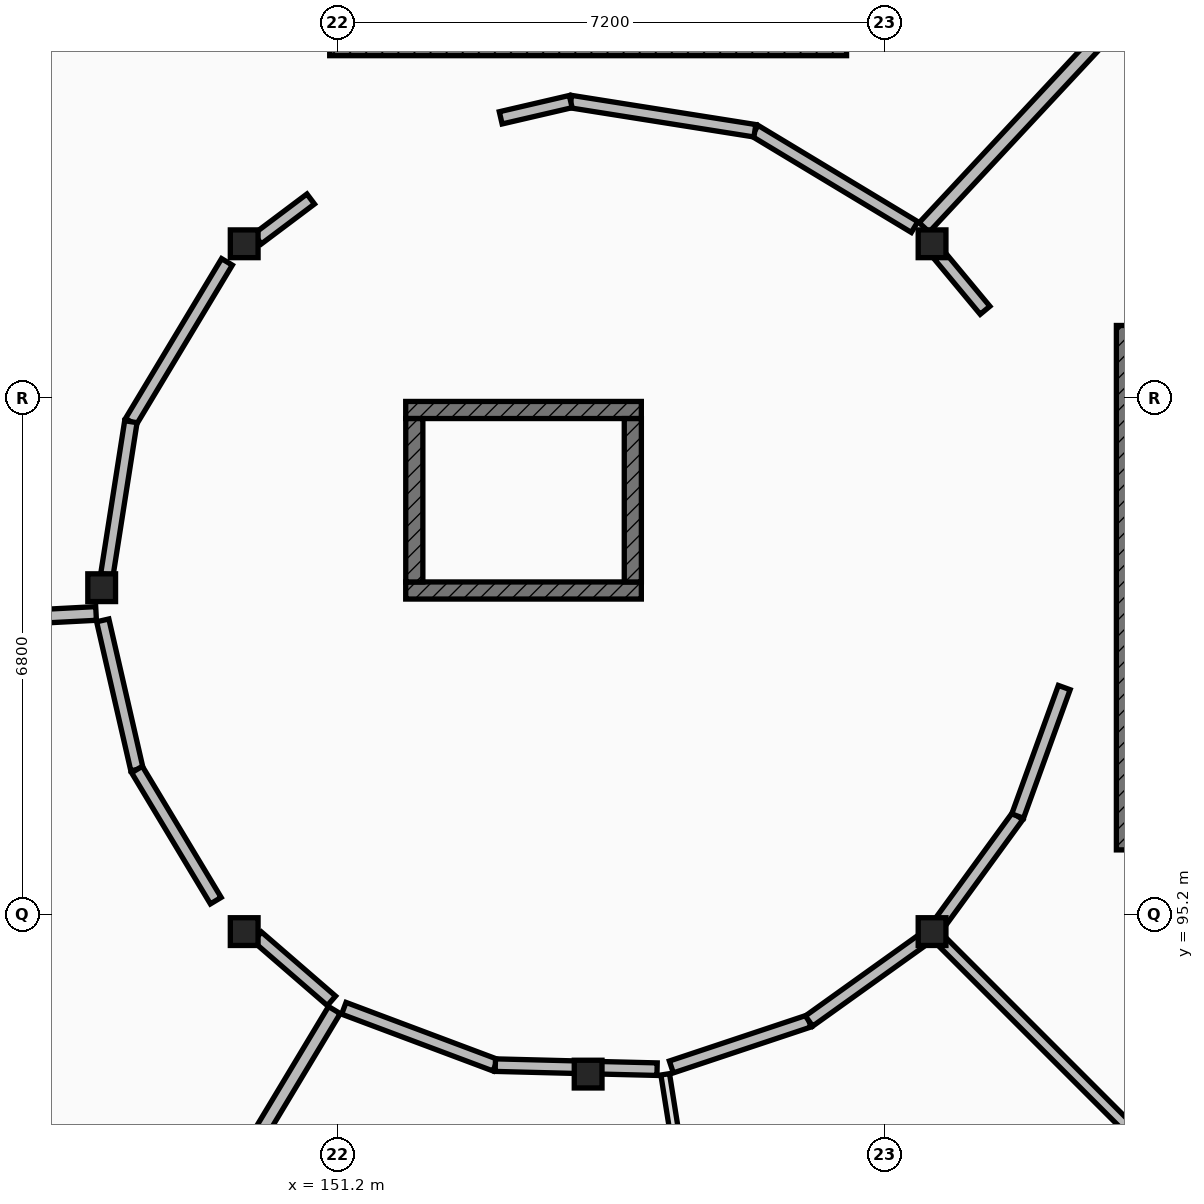
"""IFC4 building model, lengths in metres.
Left out: names, types, materials, properties, quantities, classifications, styles, units other than length and angle.
Written with IfcOpenShell. Run it as: python <this file> out.ifc"""

import sys

from ifc_helpers import new_model, si_unit, direction, frame, frame_2d, origin, origin_2d, place, context, subcontext, project, spatial, rectangle, extrude, element, fill, save


model = new_model("IFC4")
c1 = context("Model", 3, precision=1e-05, world=origin(), true_north=direction((0.0, 1.0)))
c2 = subcontext(c1, "Body", "Model", "MODEL_VIEW")
j1 = project(units=[si_unit("LENGTHUNIT", "METRE"), si_unit("PLANEANGLEUNIT", "RADIAN")], contexts=[c1])
p1 = place(None, origin())
s1 = spatial("IfcSite", under=j1, at=p1, CompositionType="ELEMENT")
p2 = place(p1, origin())
s2 = spatial("IfcBuilding", under=s1, at=p2, CompositionType="ELEMENT")
p3 = place(p2, frame((0.0, 0.0, 4.55)))
s3 = spatial("IfcBuildingStorey", under=s2, at=p3, CompositionType="ELEMENT", Elevation=4.55)
for number, where, z_axis, x_axis in (
    (1, (159.025, 104.025, 0.0), (0.0, 0.0, 1.0), (1.0, 0.0, 0.0)),
    (2, (149.975, 104.025, 0.0), (0.0, 0.0, 1.0), (1.0, 0.0, 0.0)),
    (3, (148.1, 99.5, 0.0), (0.0, 0.0, 1.0), (1.0, 0.0, 0.0)),
    (4, (149.975, 94.975, 0.0), (0.0, 0.0, 1.0), (1.0, 0.0, 0.0)),
    (5, (154.5, 93.1, 0.0), (0.0, 0.0, 1.0), (1.0, 0.0, 0.0)),
    (6, (159.025, 94.975, 0.0), (0.0, 0.0, 1.0), (1.0, 0.0, 0.0)),
):
    element("IfcColumn", number, at=place(p3, frame(where, z_axis=z_axis, x_axis=x_axis)), inside=s3, PredefinedType="COLUMN", context=c2, shape_type="SweptSolid", body=[
        extrude(rectangle(XDim=0.365, YDim=0.365, at=origin_2d()), origin(), (0.0, 0.0, 1.0), 4.2),
    ])
p4 = place(p3, frame((161.575, 102.95, 0.0), z_axis=(0.0, 0.0, 1.0), x_axis=(0.0, -1.0, 0.0)))
e7 = element("IfcWall", 7, at=p4, inside=s3, PredefinedType="SHEAR", context=c2, shape_type="SweptSolid", body=[
    extrude(rectangle(XDim=6.9, YDim=0.25, at=frame_2d((3.45, 0.0))), origin(), (0.0, 0.0, 1.0), 3.955),
])
p5 = place(p4, frame((0.43, 0.0, 0.0)))
e8 = element("IfcOpeningElement", 8, at=p5, cuts=e7, PredefinedType="OPENING", context=c2, shape_type="SweptSolid", body=[
    extrude(rectangle(XDim=1.1, YDim=2.15, at=frame_2d((0.55, 1.075))), frame((0.0, 0.135, 0.0), z_axis=(0.0, -1.0, 0.0), x_axis=(1.0, 0.0, 0.0)), (0.0, 0.0, 1.0), 0.27),
])
p6 = place(p3, frame((151.1, 106.6, 0.0), z_axis=(0.0, 0.0, 1.0), x_axis=(1.0, 0.0, 0.0)))
e9 = element("IfcWall", 9, at=p6, inside=s3, PredefinedType="SHEAR", context=c2, shape_type="SweptSolid", body=[
    extrude(rectangle(XDim=6.8, YDim=0.2, at=frame_2d((3.4, 0.0))), origin(), (0.0, 0.0, 1.0), 3.955),
])
p7 = place(p6, frame((0.38, 0.0, 0.0)))
e10 = element("IfcOpeningElement", 10, at=p7, cuts=e9, PredefinedType="OPENING", context=c2, shape_type="SweptSolid", body=[
    extrude(rectangle(XDim=1.05, YDim=2.15, at=frame_2d((0.525, 1.075))), frame((0.0, 0.11, 0.0), z_axis=(0.0, -1.0, 0.0), x_axis=(1.0, 0.0, 0.0)), (0.0, 0.0, 1.0), 0.22),
])
p8 = place(p3, frame((152.1, 99.463, 0.0), z_axis=(0.0, 0.0, 1.0), x_axis=(1.0, 0.0, 0.0)))
e11 = element("IfcWall", 11, at=p8, inside=s3, PredefinedType="SHEAR", context=c2, shape_type="SweptSolid", body=[
    extrude(rectangle(XDim=3.1, YDim=0.225, at=frame_2d((1.55, 0.0))), origin(), (0.0, 0.0, 1.0), 3.955),
])
p9 = place(p8, frame((0.9, 0.0, 0.0)))
e12 = element("IfcOpeningElement", 12, at=p9, cuts=e11, PredefinedType="OPENING", context=c2, shape_type="SweptSolid", body=[
    extrude(rectangle(XDim=1.3, YDim=2.2, at=frame_2d((0.65, 1.1))), frame((0.0, 0.123, 0.0), z_axis=(0.0, -1.0, 0.0), x_axis=(1.0, 0.0, 0.0)), (0.0, 0.0, 1.0), 0.245),
])
p10 = place(p3, frame((152.1, 101.838, 0.0), z_axis=(0.0, 0.0, 1.0), x_axis=(1.0, 0.0, 0.0)))
e13 = element("IfcWall", 13, at=p10, inside=s3, PredefinedType="SHEAR", context=c2, shape_type="SweptSolid", body=[
    extrude(rectangle(XDim=3.1, YDim=0.225, at=frame_2d((1.55, 0.0))), origin(), (0.0, 0.0, 1.0), 3.955),
])
for number, where, z_axis, x_axis in (
    (14, (152.213, 99.575, 0.0), (0.0, 0.0, 1.0), (0.0, 1.0, 0.0)),
    (15, (155.088, 99.575, 0.0), (0.0, 0.0, 1.0), (0.0, 1.0, 0.0)),
):
    element("IfcWall", number, at=place(p3, frame(where, z_axis=z_axis, x_axis=x_axis)), inside=s3, PredefinedType="SHEAR", context=c2, shape_type="SweptSolid", body=[
        extrude(rectangle(XDim=2.15, YDim=0.225, at=frame_2d((1.075, 0.0))), origin(), (0.0, 0.0, 1.0), 3.955),
    ])
p11 = place(p3, frame((158.921, 104.241, 0.0), z_axis=(0.0, 0.0, 1.0), x_axis=(0.681975712302, 0.731374820342, 0.0)))
e16 = element("IfcWall", 16, at=p11, inside=s3, PredefinedType="PARTITIONING", context=c2, shape_type="SweptSolid", body=[
    extrude(rectangle(XDim=5.283, YDim=0.18, at=frame_2d((2.642, 0.0))), origin(), (0.0, 0.0, 1.0), 3.284),
])
p12 = place(p3, frame((148.026, 99.161, 0.0), z_axis=(0.0, 0.0, 1.0), x_axis=(-0.998629447921, -0.052337613105, 0.0)))
e17 = element("IfcWall", 17, at=p12, inside=s3, PredefinedType="PARTITIONING", context=c2, shape_type="SweptSolid", body=[
    extrude(rectangle(XDim=5.271, YDim=0.18, at=frame_2d((2.636, 0.0))), origin(), (0.0, 0.0, 1.0), 3.284),
])
p13 = place(p3, frame((151.161, 93.943, 0.0), z_axis=(0.0, 0.0, 1.0), x_axis=(-0.515026730069, -0.857174117268, 0.0)))
e18 = element("IfcWall", 18, at=p13, inside=s3, PredefinedType="PARTITIONING", context=c2, shape_type="SweptSolid", body=[
    extrude(rectangle(XDim=5.273, YDim=0.18, at=frame_2d((2.637, 0.0))), origin(), (0.0, 0.0, 1.0), 3.284),
])
p14 = place(p3, frame((155.514, 93.097, 0.0), z_axis=(0.0, 0.0, 1.0), x_axis=(0.156475439167, -0.98768185006, 0.0)))
e19 = element("IfcWall", 19, at=p14, inside=s3, PredefinedType="PARTITIONING", context=c2, shape_type="SweptSolid", body=[
    extrude(rectangle(XDim=5.28, YDim=0.115, at=frame_2d((2.64, 0.0))), origin(), (0.0, 0.0, 1.0), 3.284),
])
p15 = place(p3, frame((159.084, 94.916, 0.0), z_axis=(0.0, 0.0, 1.0), x_axis=(0.707106781187, -0.707106781187, 0.0)))
e20 = element("IfcWall", 20, at=p15, inside=s3, PredefinedType="PARTITIONING", context=c2, shape_type="SweptSolid", body=[
    extrude(rectangle(XDim=5.316, YDim=0.145, at=frame_2d((2.658, 0.0))), origin(), (0.0, 0.0, 1.0), 3.284),
])
p16 = place(p3, frame((158.795, 104.245, 0.0), z_axis=(0.0, 0.0, 1.0), x_axis=(-0.856349289231, 0.51639703217, 0.0)))
e21 = element("IfcWall", 21, at=p16, inside=s3, PredefinedType="PARTITIONING", context=c2, shape_type="SweptSolid", body=[
    extrude(rectangle(XDim=2.453, YDim=0.165, at=frame_2d((1.227, 0.0))), origin(), (0.0, 0.0, 1.0), 3.284),
])
p17 = place(p16, frame((0.477, 0.0, 0.0)))
e22 = element("IfcOpeningElement", 22, at=p17, cuts=e21, PredefinedType="OPENING", context=c2, shape_type="SweptSolid", body=[
    extrude(rectangle(XDim=1.5, YDim=2.3, at=frame_2d((0.75, 1.15))), frame((0.0, 0.093, 0.0), z_axis=(0.0, -1.0, 0.0), x_axis=(1.0, 0.0, 0.0)), (0.0, 0.0, 1.0), 0.185),
])
p18 = place(p3, frame((156.694, 105.512, 0.0), z_axis=(0.0, 0.0, 1.0), x_axis=(-0.987672430412, 0.156534884941, 0.0)))
e23 = element("IfcWall", 23, at=p18, inside=s3, PredefinedType="PARTITIONING", context=c2, shape_type="SweptSolid", body=[
    extrude(rectangle(XDim=2.453, YDim=0.165, at=frame_2d((1.227, 0.0))), origin(), (0.0, 0.0, 1.0), 3.284),
])
p19 = place(p3, frame((154.271, 105.896, 0.0), z_axis=(0.0, 0.0, 1.0), x_axis=(-0.974019949823, -0.226462220571, 0.0)))
e24 = element("IfcWall", 24, at=p19, inside=s3, PredefinedType="PARTITIONING", context=c2, shape_type="SweptSolid", body=[
    extrude(rectangle(XDim=0.946, YDim=0.165, at=frame_2d((0.473, 0.0))), origin(), (0.0, 0.0, 1.0), 3.284),
])
p20 = place(p3, frame((150.85, 104.614, 0.0), z_axis=(0.0, 0.0, 1.0), x_axis=(-0.799731853613, -0.600357362174, 0.0)))
e25 = element("IfcWall", 25, at=p20, inside=s3, PredefinedType="PARTITIONING", context=c2, shape_type="SweptSolid", body=[
    extrude(rectangle(XDim=0.874, YDim=0.165, at=frame_2d((0.437, 0.0))), origin(), (0.0, 0.0, 1.0), 3.284),
])
p21 = place(p3, frame((149.748, 103.787, 0.0), z_axis=(0.0, 0.0, 1.0), x_axis=(-0.515197917959, -0.857071237022, 0.0)))
e26 = element("IfcWall", 26, at=p21, inside=s3, PredefinedType="PARTITIONING", context=c2, shape_type="SweptSolid", body=[
    extrude(rectangle(XDim=2.454, YDim=0.165, at=frame_2d((1.227, 0.0))), origin(), (0.0, 0.0, 1.0), 3.284),
])
p22 = place(p21, frame((0.527, 0.0, 0.0)))
e27 = element("IfcOpeningElement", 27, at=p22, cuts=e26, PredefinedType="OPENING", context=c2, shape_type="SweptSolid", body=[
    extrude(rectangle(XDim=1.4, YDim=2.25, at=frame_2d((0.7, 1.125))), frame((0.0, 0.093, 0.0), z_axis=(0.0, -1.0, 0.0), x_axis=(1.0, 0.0, 0.0)), (0.0, 0.0, 1.0), 0.185),
])
p23 = place(p3, frame((148.484, 101.684, 0.0), z_axis=(0.0, 0.0, 1.0), x_axis=(-0.154797832722, -0.98794616806, 0.0)))
e28 = element("IfcWall", 28, at=p23, inside=s3, PredefinedType="PARTITIONING", context=c2, shape_type="SweptSolid", body=[
    extrude(rectangle(XDim=2.034, YDim=0.165, at=frame_2d((1.017, 0.0))), origin(), (0.0, 0.0, 1.0), 3.284),
])
p24 = place(p3, frame((148.114, 99.07, 0.0), z_axis=(0.0, 0.0, 1.0), x_axis=(0.223512984269, -0.974700952017, 0.0)))
e29 = element("IfcWall", 29, at=p24, inside=s3, PredefinedType="PARTITIONING", context=c2, shape_type="SweptSolid", body=[
    extrude(rectangle(XDim=2.013, YDim=0.165, at=frame_2d((1.007, 0.0))), origin(), (0.0, 0.0, 1.0), 3.284),
])
p25 = place(p24, frame((0.257, 0.0, 0.0)))
e30 = element("IfcOpeningElement", 30, at=p25, cuts=e29, PredefinedType="OPENING", context=c2, shape_type="SweptSolid", body=[
    extrude(rectangle(XDim=1.5, YDim=2.3, at=frame_2d((0.75, 1.15))), frame((0.0, 0.093, 0.0), z_axis=(0.0, -1.0, 0.0), x_axis=(1.0, 0.0, 0.0)), (0.0, 0.0, 1.0), 0.185),
])
p26 = place(p3, frame((148.564, 97.108, 0.0), z_axis=(0.0, 0.0, 1.0), x_axis=(0.515084069478, -0.857139662698, 0.0)))
e31 = element("IfcWall", 31, at=p26, inside=s3, PredefinedType="PARTITIONING", context=c2, shape_type="SweptSolid", body=[
    extrude(rectangle(XDim=2.013, YDim=0.165, at=frame_2d((1.007, 0.0))), origin(), (0.0, 0.0, 1.0), 3.284),
])
p27 = place(p3, frame((150.149, 94.907, 0.0), z_axis=(0.0, 0.0, 1.0), x_axis=(0.756157862191, -0.654389247655, 0.0)))
e32 = element("IfcWall", 32, at=p27, inside=s3, PredefinedType="PARTITIONING", context=c2, shape_type="SweptSolid", body=[
    extrude(rectangle(XDim=1.288, YDim=0.165, at=frame_2d((0.644, 0.0))), origin(), (0.0, 0.0, 1.0), 3.284),
])
p28 = place(p3, frame((151.286, 93.966, 0.0), z_axis=(0.0, 0.0, 1.0), x_axis=(0.93623488757, -0.35137477897, 0.0)))
e33 = element("IfcWall", 33, at=p28, inside=s3, PredefinedType="PARTITIONING", context=c2, shape_type="SweptSolid", body=[
    extrude(rectangle(XDim=2.129, YDim=0.165, at=frame_2d((1.064, 0.0))), origin(), (0.0, 0.0, 1.0), 3.284),
])
p29 = place(p28, frame((0.365, 0.0, 0.0)))
e34 = element("IfcOpeningElement", 34, at=p29, cuts=e33, PredefinedType="OPENING", context=c2, shape_type="SweptSolid", body=[
    extrude(rectangle(XDim=1.4, YDim=2.25, at=frame_2d((0.7, 1.125))), frame((0.0, 0.093, 0.0), z_axis=(0.0, -1.0, 0.0), x_axis=(1.0, 0.0, 0.0)), (0.0, 0.0, 1.0), 0.185),
])
p30 = place(p3, frame((153.279, 93.218, 0.0), z_axis=(0.0, 0.0, 1.0), x_axis=(0.999671430909, -0.025632600793, 0.0)))
e35 = element("IfcWall", 35, at=p30, inside=s3, PredefinedType="PARTITIONING", context=c2, shape_type="SweptSolid", body=[
    extrude(rectangle(XDim=1.057, YDim=0.165, at=frame_2d((0.529, 0.0))), origin(), (0.0, 0.0, 1.0), 3.284),
])
p31 = place(p3, frame((154.668, 93.183, 0.0), z_axis=(0.0, 0.0, 1.0), x_axis=(0.999701314602, -0.024439344989, 0.0)))
e36 = element("IfcWall", 36, at=p31, inside=s3, PredefinedType="PARTITIONING", context=c2, shape_type="SweptSolid", body=[
    extrude(rectangle(XDim=0.739, YDim=0.165, at=frame_2d((0.37, 0.0))), origin(), (0.0, 0.0, 1.0), 3.284),
])
p32 = place(p3, frame((155.595, 93.194, 0.0), z_axis=(0.0, 0.0, 1.0), x_axis=(0.948632132652, 0.316381220839, 0.0)))
e37 = element("IfcWall", 37, at=p32, inside=s3, PredefinedType="PARTITIONING", context=c2, shape_type="SweptSolid", body=[
    extrude(rectangle(XDim=1.909, YDim=0.165, at=frame_2d((0.955, 0.0))), origin(), (0.0, 0.0, 1.0), 3.284),
])
p33 = place(p32, frame((0.514, 0.0, 0.0)))
e38 = element("IfcOpeningElement", 38, at=p33, cuts=e37, PredefinedType="OPENING", context=c2, shape_type="SweptSolid", body=[
    extrude(rectangle(XDim=0.88, YDim=2.1, at=frame_2d((0.44, 1.05))), frame((0.0, 0.093, 0.0), z_axis=(0.0, -1.0, 0.0), x_axis=(1.0, 0.0, 0.0)), (0.0, 0.0, 1.0), 0.185),
])
p34 = place(p3, frame((157.406, 93.798, 0.0), z_axis=(0.0, 0.0, 1.0), x_axis=(0.813324248, 0.581810680218, 0.0)))
e39 = element("IfcWall", 39, at=p34, inside=s3, PredefinedType="PARTITIONING", context=c2, shape_type="SweptSolid", body=[
    extrude(rectangle(XDim=1.815, YDim=0.165, at=frame_2d((0.907, 0.0))), origin(), (0.0, 0.0, 1.0), 3.284),
])
p35 = place(p3, frame((159.147, 95.117, 0.0), z_axis=(0.0, 0.0, 1.0), x_axis=(0.588784523438, 0.808290037647, 0.0)))
e40 = element("IfcWall", 40, at=p35, inside=s3, PredefinedType="PARTITIONING", context=c2, shape_type="SweptSolid", body=[
    extrude(rectangle(XDim=1.705, YDim=0.165, at=frame_2d((0.853, 0.0))), origin(), (0.0, 0.0, 1.0), 3.284),
])
p36 = place(p35, frame((0.298, 0.0, 0.0)))
e41 = element("IfcOpeningElement", 41, at=p36, cuts=e40, PredefinedType="OPENING", context=c2, shape_type="SweptSolid", body=[
    extrude(rectangle(XDim=1.11, YDim=2.25, at=frame_2d((0.555, 1.125))), frame((0.0, 0.093, 0.0), z_axis=(0.0, -1.0, 0.0), x_axis=(1.0, 0.0, 0.0)), (0.0, 0.0, 1.0), 0.185),
])
p37 = place(p3, frame((160.151, 96.495, 0.0), z_axis=(0.0, 0.0, 1.0), x_axis=(0.340838314518, 0.940121930048, 0.0)))
e42 = element("IfcWall", 42, at=p37, inside=s3, PredefinedType="PARTITIONING", context=c2, shape_type="SweptSolid", body=[
    extrude(rectangle(XDim=1.799, YDim=0.165, at=frame_2d((0.899, 0.0))), origin(), (0.0, 0.0, 1.0), 3.284),
])
p38 = place(p3, frame((159.722, 103.15, 0.0), z_axis=(0.0, 0.0, 1.0), x_axis=(-0.639179373109, 0.769057688988, 0.0)))
e43 = element("IfcWall", 43, at=p38, inside=s3, PredefinedType="PARTITIONING", context=c2, shape_type="SweptSolid", body=[
    extrude(rectangle(XDim=0.932, YDim=0.165, at=frame_2d((0.466, 0.0))), origin(), (0.0, 0.0, 1.0), 3.284),
])
p39 = place(p5, origin())
e44 = element("IfcDoor", 44, at=p39, inside=s3, OperationType="SINGLE_SWING_LEFT", PredefinedType="DOOR", context=c2, shape_type="SweptSolid", body=[
    extrude(rectangle(XDim=1.1, YDim=2.15, at=frame_2d((0.55, 1.075))), frame((0.0, 0.025, 0.0), z_axis=(0.0, -1.0, 0.0), x_axis=(1.0, 0.0, 0.0)), (0.0, 0.0, 1.0), 0.05),
])
fill(e8, e44)
p40 = place(p9, origin())
e45 = element("IfcDoor", 45, at=p40, inside=s3, OperationType="DOUBLE_DOOR_SLIDING", PredefinedType="DOOR", context=c2, shape_type="SweptSolid", body=[
    extrude(rectangle(XDim=1.3, YDim=2.2, at=frame_2d((0.65, 1.1))), frame((0.0, 0.025, 0.0), z_axis=(0.0, -1.0, 0.0), x_axis=(1.0, 0.0, 0.0)), (0.0, 0.0, 1.0), 0.05),
])
fill(e12, e45)
p41 = place(p17, origin())
e46 = element("IfcDoor", 46, at=p41, inside=s3, OperationType="SINGLE_SWING_LEFT", PredefinedType="DOOR", context=c2, shape_type="SweptSolid", body=[
    extrude(rectangle(XDim=1.5, YDim=2.3, at=frame_2d((0.75, 1.15))), frame((0.0, 0.025, 0.0), z_axis=(0.0, -1.0, 0.0), x_axis=(1.0, 0.0, 0.0)), (0.0, 0.0, 1.0), 0.05),
])
fill(e22, e46)
p42 = place(p22, origin())
e47 = element("IfcDoor", 47, at=p42, inside=s3, OperationType="SINGLE_SWING_RIGHT", PredefinedType="DOOR", context=c2, shape_type="SweptSolid", body=[
    extrude(rectangle(XDim=1.4, YDim=2.25, at=frame_2d((0.7, 1.125))), frame((0.0, 0.025, 0.0), z_axis=(0.0, -1.0, 0.0), x_axis=(1.0, 0.0, 0.0)), (0.0, 0.0, 1.0), 0.05),
])
fill(e27, e47)
p43 = place(p25, origin())
e48 = element("IfcDoor", 48, at=p43, inside=s3, OperationType="SINGLE_SWING_LEFT", PredefinedType="DOOR", context=c2, shape_type="SweptSolid", body=[
    extrude(rectangle(XDim=1.5, YDim=2.3, at=frame_2d((0.75, 1.15))), frame((0.0, 0.025, 0.0), z_axis=(0.0, -1.0, 0.0), x_axis=(1.0, 0.0, 0.0)), (0.0, 0.0, 1.0), 0.05),
])
fill(e30, e48)
p44 = place(p29, origin())
e49 = element("IfcDoor", 49, at=p44, inside=s3, OperationType="SINGLE_SWING_RIGHT", PredefinedType="DOOR", context=c2, shape_type="SweptSolid", body=[
    extrude(rectangle(XDim=1.4, YDim=2.25, at=frame_2d((0.7, 1.125))), frame((0.0, 0.025, 0.0), z_axis=(0.0, -1.0, 0.0), x_axis=(1.0, 0.0, 0.0)), (0.0, 0.0, 1.0), 0.05),
])
fill(e34, e49)
p45 = place(p33, origin())
e50 = element("IfcDoor", 50, at=p45, inside=s3, OperationType="SINGLE_SWING_LEFT", PredefinedType="DOOR", context=c2, shape_type="SweptSolid", body=[
    extrude(rectangle(XDim=0.88, YDim=2.1, at=frame_2d((0.44, 1.05))), frame((0.0, 0.025, 0.0), z_axis=(0.0, -1.0, 0.0), x_axis=(1.0, 0.0, 0.0)), (0.0, 0.0, 1.0), 0.05),
])
fill(e38, e50)
p46 = place(p36, origin())
e51 = element("IfcDoor", 51, at=p46, inside=s3, OperationType="SINGLE_SWING_RIGHT", PredefinedType="DOOR", context=c2, shape_type="SweptSolid", body=[
    extrude(rectangle(XDim=1.11, YDim=2.25, at=frame_2d((0.555, 1.125))), frame((0.0, 0.025, 0.0), z_axis=(0.0, -1.0, 0.0), x_axis=(1.0, 0.0, 0.0)), (0.0, 0.0, 1.0), 0.05),
])
fill(e41, e51)
save(model, sys.argv[1])
